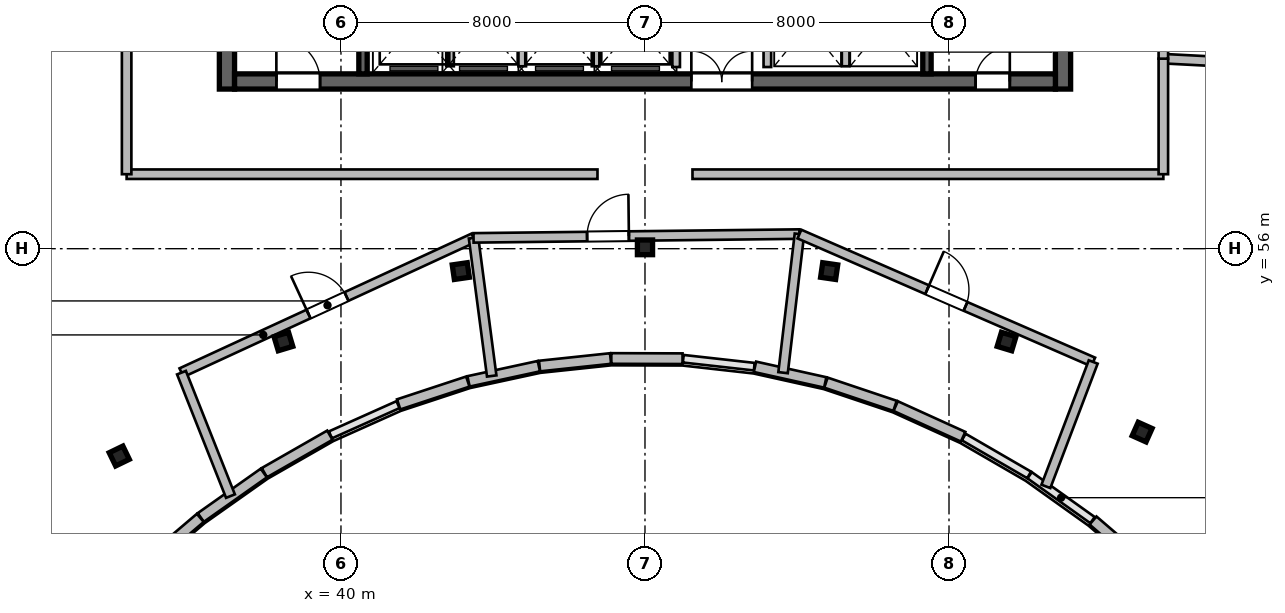
"""IFC4 building model, lengths in metres.
Left out: names, types, materials, properties, quantities, classifications, styles, units other than length and angle.
Written with IfcOpenShell. Run it as: python <this file> out.ifc"""

import sys

from ifc_helpers import new_model, si_unit, direction, frame, frame_2d, origin, origin_2d, place, context, subcontext, project, spatial, rectangle, i_section, extrude, source, transform, mapped, element, fill, save


model = new_model("IFC4")
c1 = context("Model", 3, precision=1e-05, world=origin(), true_north=direction((0.0, 1.0)))
c2 = subcontext(c1, "Body", "Model", "MODEL_VIEW")
j1 = project(units=[si_unit("LENGTHUNIT", "METRE"), si_unit("PLANEANGLEUNIT", "RADIAN")], contexts=[c1])
p1 = place(None, origin())
s1 = spatial("IfcSite", under=j1, at=p1, CompositionType="ELEMENT")
p2 = place(p1, origin())
s2 = spatial("IfcBuilding", under=s1, at=p2, CompositionType="ELEMENT")
p3 = place(p2, frame((0.0, 0.0, 260.1)))
s3 = spatial("IfcBuildingStorey", under=s2, at=p3, CompositionType="ELEMENT", Elevation=260.1)
m1 = source(origin(), c2, "Body", "SweptSolid", [
    extrude(rectangle(XDim=12.0, YDim=0.4, at=frame_2d((6.0, 0.0))), origin(), (0.0, 0.0, 1.0), 3.9),
])
for number, where, z_axis, x_axis in (
    (1, (37.0, 60.2, 0.0), (0.0, 0.0, 1.0), (0.0, 1.0, 0.0)),
    (2, (59.0, 60.2, 0.0), (0.0, 0.0, 1.0), (0.0, 1.0, 0.0)),
):
    element("IfcWall", number, at=place(p3, frame(where, z_axis=z_axis, x_axis=x_axis)), inside=s3, PredefinedType="SHEAR", context=c2, shape_type="MappedRepresentation", body=[
        mapped(m1, transform((0.0, 0.0, 0.0), scale=1.0)),
    ])
m2 = source(origin(), c2, "Body", "SweptSolid", [
    extrude(rectangle(XDim=21.6, YDim=0.4, at=frame_2d((10.8, 0.0))), origin(), (0.0, 0.0, 1.0), 3.9),
])
p4 = place(p3, frame((37.2, 60.4, 0.0), z_axis=(0.0, 0.0, 1.0), x_axis=(1.0, 0.0, 0.0)))
e3 = element("IfcWall", 3, at=p4, inside=s3, PredefinedType="SHEAR", context=c2, shape_type="MappedRepresentation", body=[
    mapped(m2, transform((0.0, 0.0, 0.0), scale=1.0)),
])
p5 = place(p4, frame((1.1, 0.0, 0.0)))
e4 = element("IfcOpeningElement", 4, at=p5, cuts=e3, PredefinedType="OPENING", context=c2, shape_type="SweptSolid", body=[
    extrude(rectangle(XDim=1.15, YDim=2.15, at=frame_2d((0.575, 1.075))), frame((0.0, 0.21, 0.0), z_axis=(0.0, -1.0, 0.0), x_axis=(1.0, 0.0, 0.0)), (0.0, 0.0, 1.0), 0.42),
])
p6 = place(p4, frame((19.5, 0.0, 0.0)))
e5 = element("IfcOpeningElement", 5, at=p6, cuts=e3, PredefinedType="OPENING", context=c2, shape_type="SweptSolid", body=[
    extrude(rectangle(XDim=0.9, YDim=2.1, at=frame_2d((0.45, 1.05))), frame((0.0, 0.21, 0.0), z_axis=(0.0, -1.0, 0.0), x_axis=(1.0, 0.0, 0.0)), (0.0, 0.0, 1.0), 0.42),
])
p7 = place(p4, frame((12.02, 0.0, 0.0)))
e6 = element("IfcOpeningElement", 6, at=p7, cuts=e3, PredefinedType="OPENING", context=c2, shape_type="SweptSolid", body=[
    extrude(rectangle(XDim=1.6, YDim=2.15, at=frame_2d((0.8, 1.075))), frame((0.0, 0.21, 0.0), z_axis=(0.0, -1.0, 0.0), x_axis=(1.0, 0.0, 0.0)), (0.0, 0.0, 1.0), 0.42),
])
m3 = source(origin(), c2, "Body", "SweptSolid", [
    extrude(rectangle(XDim=11.2, YDim=0.22, at=frame_2d((5.6, 0.0))), origin(), (0.0, 0.0, 1.0), 3.9),
])
p8 = place(p3, frame((40.58, 60.6, 0.0), z_axis=(0.0, 0.0, 1.0), x_axis=(0.0, 1.0, 0.0)))
e7 = element("IfcWall", 7, at=p8, inside=s3, PredefinedType="SHEAR", context=c2, shape_type="MappedRepresentation", body=[
    mapped(m3, transform((0.0, 0.0, 0.0), scale=1.0)),
])
p9 = place(p3, frame((55.42, 60.6, 0.0), z_axis=(0.0, 0.0, 1.0), x_axis=(0.0, 1.0, 0.0)))
e8 = element("IfcWall", 8, at=p9, inside=s3, PredefinedType="SHEAR", context=c2, shape_type="MappedRepresentation", body=[
    mapped(m3, transform((0.0, 0.0, 0.0), scale=1.0)),
])
p10 = place(p9, frame((9.645, 0.0, 0.0)))
e9 = element("IfcOpeningElement", 9, at=p10, cuts=e8, PredefinedType="OPENING", context=c2, shape_type="SweptSolid", body=[
    extrude(rectangle(XDim=1.15, YDim=2.15, at=frame_2d((0.575, 1.075))), frame((0.0, 0.12, 0.0), z_axis=(0.0, -1.0, 0.0), x_axis=(1.0, 0.0, 0.0)), (0.0, 0.0, 1.0), 0.24),
])
m4 = source(origin(), c2, "Body", "SweptSolid", [
    extrude(i_section(OverallWidth=0.399, OverallDepth=0.387, WebThickness=0.021, FlangeThickness=0.033, at=origin_2d()), origin(), (0.0, 0.0, 1.0), 3.9),
])
for number, where, z_axis, x_axis in (
    (10, (34.166, 50.545, 0.0), (0.0, 0.0, 1.0), (-0.436, 0.9, 0.0)),
    (11, (38.485, 53.558, 0.0), (0.0, 0.0, 1.0), (-0.289, 0.957, 0.0)),
    (12, (43.154, 55.411, 0.0), (0.0, 0.0, 1.0), (-0.143, 0.99, 0.0)),
    (13, (48.0, 56.036, 0.0), (0.0, 0.0, 1.0), (0.0, 1.0, 0.0)),
    (14, (52.846, 55.411, 0.0), (0.0, 0.0, 1.0), (0.143, 0.99, 0.0)),
    (15, (57.515, 53.558, 0.0), (0.0, 0.0, 1.0), (0.289, 0.957, 0.0)),
    (16, (61.082, 51.175, 0.0), (0.0, 0.0, 1.0), (0.409, 0.912, 0.0)),
):
    element("IfcColumn", number, at=place(p3, frame(where, z_axis=z_axis, x_axis=x_axis)), inside=s3, PredefinedType="COLUMN", context=c2, shape_type="MappedRepresentation", body=[
        mapped(m4, transform((0.0, 0.0, 0.0), scale=1.0)),
    ])
m5 = source(origin(), c2, "Body", "SweptSolid", [
    extrude(rectangle(XDim=2.04, YDim=0.28, at=frame_2d((1.02, 0.0))), origin(), (0.0, 0.0, 1.0), 3.65),
])
p11 = place(p3, frame((61.337, 47.519, 0.0), z_axis=(0.0, 0.0, 1.0), x_axis=(-0.758402847119, 0.651786101019, 0.0)))
e17 = element("IfcWall", 17, at=p11, inside=s3, PredefinedType="SOLIDWALL", context=c2, shape_type="MappedRepresentation", body=[
    mapped(m5, transform((0.0, 0.0, 0.0), scale=1.0)),
])
m6 = source(origin(), c2, "Body", "SweptSolid", [
    extrude(rectangle(XDim=1.95, YDim=0.28, at=frame_2d((0.975, 0.0))), origin(), (0.0, 0.0, 1.0), 3.65),
])
p12 = place(p3, frame((56.372, 51.052, 0.0), z_axis=(0.0, 0.0, 1.0), x_axis=(-0.910507945155, 0.413491574048, 0.0)))
e18 = element("IfcWall", 18, at=p12, inside=s3, PredefinedType="SOLIDWALL", context=c2, shape_type="MappedRepresentation", body=[
    mapped(m6, transform((0.0, 0.0, 0.0), scale=1.0)),
])
m7 = source(origin(), c2, "Body", "SweptSolid", [
    extrude(rectangle(XDim=1.918, YDim=0.28, at=frame_2d((0.959, 0.0))), origin(), (0.0, 0.0, 1.0), 3.65),
])
p13 = place(p3, frame((54.579, 51.865, 0.0), z_axis=(0.0, 0.0, 1.0), x_axis=(-0.947916697588, 0.318518342381, 0.0)))
e19 = element("IfcWall", 19, at=p13, inside=s3, PredefinedType="SOLIDWALL", context=c2, shape_type="MappedRepresentation", body=[
    mapped(m7, transform((0.0, 0.0, 0.0), scale=1.0)),
])
m8 = source(origin(), c2, "Body", "SweptSolid", [
    extrude(rectangle(XDim=1.894, YDim=0.28, at=frame_2d((0.947, 0.0))), origin(), (0.0, 0.0, 1.0), 3.65),
])
p14 = place(p3, frame((52.743, 52.481, 0.0), z_axis=(0.0, 0.0, 1.0), x_axis=(-0.976156721324, 0.217066937635, 0.0)))
e20 = element("IfcWall", 20, at=p14, inside=s3, PredefinedType="SOLIDWALL", context=c2, shape_type="MappedRepresentation", body=[
    mapped(m8, transform((0.0, 0.0, 0.0), scale=1.0)),
])
m9 = source(origin(), c2, "Body", "SweptSolid", [
    extrude(rectangle(XDim=1.874, YDim=0.28, at=frame_2d((0.937, 0.0))), origin(), (0.0, 0.0, 1.0), 3.65),
])
p15 = place(p3, frame((48.988, 53.106, 0.0), z_axis=(0.0, 0.0, 1.0), x_axis=(-0.999995893899, 0.002865690982, 0.0)))
e21 = element("IfcWall", 21, at=p15, inside=s3, PredefinedType="SOLIDWALL", context=c2, shape_type="MappedRepresentation", body=[
    mapped(m9, transform((0.0, 0.0, 0.0), scale=1.0)),
])
m10 = source(origin(), c2, "Body", "SweptSolid", [
    extrude(rectangle(XDim=1.879, YDim=0.28, at=frame_2d((0.939, 0.0))), origin(), (0.0, 0.0, 1.0), 3.65),
])
p16 = place(p3, frame((47.094, 53.11, 0.0), z_axis=(0.0, 0.0, 1.0), x_axis=(-0.994431872813, -0.105381451568, 0.0)))
e22 = element("IfcWall", 22, at=p16, inside=s3, PredefinedType="SOLIDWALL", context=c2, shape_type="MappedRepresentation", body=[
    mapped(m10, transform((0.0, 0.0, 0.0), scale=1.0)),
])
m11 = source(origin(), c2, "Body", "SweptSolid", [
    extrude(rectangle(XDim=1.893, YDim=0.28, at=frame_2d((0.947, 0.0))), origin(), (0.0, 0.0, 1.0), 3.65),
])
p17 = place(p3, frame((45.207, 52.909, 0.0), z_axis=(0.0, 0.0, 1.0), x_axis=(-0.977379595344, -0.21149261596, 0.0)))
e23 = element("IfcWall", 23, at=p17, inside=s3, PredefinedType="SOLIDWALL", context=c2, shape_type="MappedRepresentation", body=[
    mapped(m11, transform((0.0, 0.0, 0.0), scale=1.0)),
])
m12 = source(origin(), c2, "Body", "SweptSolid", [
    extrude(rectangle(XDim=1.916, YDim=0.28, at=frame_2d((0.958, 0.0))), origin(), (0.0, 0.0, 1.0), 3.65),
])
p18 = place(p3, frame((43.338, 52.503, 0.0), z_axis=(0.0, 0.0, 1.0), x_axis=(-0.949697632406, -0.313168336525, 0.0)))
e24 = element("IfcWall", 24, at=p18, inside=s3, PredefinedType="SOLIDWALL", context=c2, shape_type="MappedRepresentation", body=[
    mapped(m12, transform((0.0, 0.0, 0.0), scale=1.0)),
])
m13 = source(origin(), c2, "Body", "SweptSolid", [
    extrude(rectangle(XDim=1.986, YDim=0.28, at=frame_2d((0.993, 0.0))), origin(), (0.0, 0.0, 1.0), 3.65),
])
p19 = place(p3, frame((39.708, 51.093, 0.0), z_axis=(0.0, 0.0, 1.0), x_axis=(-0.867940364671, -0.496668423976, 0.0)))
e25 = element("IfcWall", 25, at=p19, inside=s3, PredefinedType="SOLIDWALL", context=c2, shape_type="MappedRepresentation", body=[
    mapped(m13, transform((0.0, 0.0, 0.0), scale=1.0)),
])
m14 = source(origin(), c2, "Body", "SweptSolid", [
    extrude(rectangle(XDim=2.03, YDim=0.28, at=frame_2d((1.015, 0.0))), origin(), (0.0, 0.0, 1.0), 3.65),
])
p20 = place(p3, frame((37.969, 50.097, 0.0), z_axis=(0.0, 0.0, 1.0), x_axis=(-0.816987864272, -0.576654861796, 0.0)))
e26 = element("IfcWall", 26, at=p20, inside=s3, PredefinedType="SOLIDWALL", context=c2, shape_type="MappedRepresentation", body=[
    mapped(m14, transform((0.0, 0.0, 0.0), scale=1.0)),
])
m15 = source(origin(), c2, "Body", "SweptSolid", [
    extrude(rectangle(XDim=2.078, YDim=0.28, at=frame_2d((1.039, 0.0))), origin(), (0.0, 0.0, 1.0), 3.65),
])
p21 = place(p3, frame((36.298, 48.917, 0.0), z_axis=(0.0, 0.0, 1.0), x_axis=(-0.761475215802, -0.648194026291, 0.0)))
e27 = element("IfcWall", 27, at=p21, inside=s3, PredefinedType="SOLIDWALL", context=c2, shape_type="MappedRepresentation", body=[
    mapped(m15, transform((0.0, 0.0, 0.0), scale=1.0)),
])
m16 = source(origin(), c2, "Body", "SweptSolid", [
    extrude(rectangle(XDim=2.24, YDim=0.2, at=frame_2d((1.12, 0.0))), origin(), (0.0, 0.0, 1.0), 3.65),
])
for number, where, z_axis, x_axis in (
    (28, (48.82, 60.78, 0.0), (0.0, 0.0, 1.0), (0.0, 1.0, 0.0)),
    (29, (51.22, 60.78, 0.0), (0.0, 0.0, 1.0), (0.0, 1.0, 0.0)),
):
    element("IfcWall", number, at=place(p3, frame(where, z_axis=z_axis, x_axis=x_axis)), inside=s3, PredefinedType="SOLIDWALL", context=c2, shape_type="MappedRepresentation", body=[
        mapped(m16, transform((0.0, 0.0, 0.0), scale=1.0)),
    ])
m17 = source(origin(), c2, "Body", "SweptSolid", [
    extrude(rectangle(XDim=2.2, YDim=0.2, at=frame_2d((1.1, 0.0))), origin(), (0.0, 0.0, 1.0), 3.65),
])
for number, where, z_axis, x_axis in (
    (30, (42.87, 60.8, 0.0), (0.0, 0.0, 1.0), (0.0, 1.0, 0.0)),
    (31, (44.77, 60.8, 0.0), (0.0, 0.0, 1.0), (0.0, 1.0, 0.0)),
    (32, (46.7, 60.8, 0.0), (0.0, 0.0, 1.0), (0.0, 1.0, 0.0)),
    (33, (53.28, 60.8, 0.0), (0.0, 0.0, 1.0), (0.0, 1.0, 0.0)),
):
    element("IfcWall", number, at=place(p3, frame(where, z_axis=z_axis, x_axis=x_axis)), inside=s3, PredefinedType="SOLIDWALL", context=c2, shape_type="MappedRepresentation", body=[
        mapped(m17, transform((0.0, 0.0, 0.0), scale=1.0)),
    ])
m18 = source(origin(), c2, "Body", "SweptSolid", [
    extrude(rectangle(XDim=8.464, YDim=0.25, at=frame_2d((4.232, 0.0))), origin(), (0.0, 0.0, 1.0), 3.65),
])
p22 = place(p3, frame((35.803, 52.738, 0.0), z_axis=(0.0, 0.0, 1.0), x_axis=(0.90801678306, 0.418933791524, 0.0)))
e34 = element("IfcWall", 34, at=p22, inside=s3, PredefinedType="PARTITIONING", context=c2, shape_type="MappedRepresentation", body=[
    mapped(m18, transform((0.0, 0.0, 0.0), scale=1.0)),
])
p23 = place(p22, frame((3.682, 0.0, 0.0)))
e35 = element("IfcOpeningElement", 35, at=p23, cuts=e34, PredefinedType="OPENING", context=c2, shape_type="SweptSolid", body=[
    extrude(rectangle(XDim=1.1, YDim=2.15, at=frame_2d((0.55, 1.075))), frame((0.0, 0.135, 0.0), z_axis=(0.0, -1.0, 0.0), x_axis=(1.0, 0.0, 0.0)), (0.0, 0.0, 1.0), 0.27),
])
m19 = source(origin(), c2, "Body", "SweptSolid", [
    extrude(rectangle(XDim=3.495, YDim=0.25, at=frame_2d((1.747, 0.0))), origin(), (0.0, 0.0, 1.0), 3.65),
])
p24 = place(p3, frame((37.092, 49.49, 0.0), z_axis=(0.0, 0.0, 1.0), x_axis=(-0.368859890644, 0.929485008526, 0.0)))
e36 = element("IfcWall", 36, at=p24, inside=s3, PredefinedType="PARTITIONING", context=c2, shape_type="MappedRepresentation", body=[
    mapped(m19, transform((0.0, 0.0, 0.0), scale=1.0)),
])
m20 = source(origin(), c2, "Body", "SweptSolid", [
    extrude(rectangle(XDim=3.665, YDim=0.25, at=frame_2d((1.832, 0.0))), origin(), (0.0, 0.0, 1.0), 3.65),
])
p25 = place(p3, frame((43.967, 52.651, 0.0), z_axis=(0.0, 0.0, 1.0), x_axis=(-0.130509659129, 0.991447037856, 0.0)))
e37 = element("IfcWall", 37, at=p25, inside=s3, PredefinedType="PARTITIONING", context=c2, shape_type="MappedRepresentation", body=[
    mapped(m20, transform((0.0, 0.0, 0.0), scale=1.0)),
])
m21 = source(origin(), c2, "Body", "SweptSolid", [
    extrude(rectangle(XDim=8.576, YDim=0.25, at=frame_2d((4.288, 0.0))), origin(), (0.0, 0.0, 1.0), 3.65),
])
p26 = place(p3, frame((43.489, 56.284, 0.0), z_axis=(0.0, 0.0, 1.0), x_axis=(0.999931553434, 0.011699933624, 0.0)))
e38 = element("IfcWall", 38, at=p26, inside=s3, PredefinedType="PARTITIONING", context=c2, shape_type="MappedRepresentation", body=[
    mapped(m21, transform((0.0, 0.0, 0.0), scale=1.0)),
])
p27 = place(p26, frame((2.988, 0.0, 0.0)))
e39 = element("IfcOpeningElement", 39, at=p27, cuts=e38, PredefinedType="OPENING", context=c2, shape_type="SweptSolid", body=[
    extrude(rectangle(XDim=1.1, YDim=2.15, at=frame_2d((0.55, 1.075))), frame((0.0, 0.135, 0.0), z_axis=(0.0, -1.0, 0.0), x_axis=(1.0, 0.0, 0.0)), (0.0, 0.0, 1.0), 0.27),
])
m22 = source(origin(), c2, "Body", "SweptSolid", [
    extrude(rectangle(XDim=3.672, YDim=0.25, at=frame_2d((1.836, 0.0))), origin(), (0.0, 0.0, 1.0), 3.65),
])
p28 = place(p3, frame((51.633, 52.738, 0.0), z_axis=(0.0, 0.0, 1.0), x_axis=(0.117362064027, 0.993089193339, 0.0)))
e40 = element("IfcWall", 40, at=p28, inside=s3, PredefinedType="PARTITIONING", context=c2, shape_type="MappedRepresentation", body=[
    mapped(m22, transform((0.0, 0.0, 0.0), scale=1.0)),
])
m23 = source(origin(), c2, "Body", "SweptSolid", [
    extrude(rectangle(XDim=8.431, YDim=0.25, at=frame_2d((4.216, 0.0))), origin(), (0.0, 0.0, 1.0), 3.65),
])
p29 = place(p3, frame((52.064, 56.385, 0.0), z_axis=(0.0, 0.0, 1.0), x_axis=(0.916868304583, -0.399189819574, 0.0)))
e41 = element("IfcWall", 41, at=p29, inside=s3, PredefinedType="PARTITIONING", context=c2, shape_type="MappedRepresentation", body=[
    mapped(m23, transform((0.0, 0.0, 0.0), scale=1.0)),
])
p30 = place(p29, frame((3.666, 0.0, 0.0)))
e42 = element("IfcOpeningElement", 42, at=p30, cuts=e41, PredefinedType="OPENING", context=c2, shape_type="SweptSolid", body=[
    extrude(rectangle(XDim=1.1, YDim=2.15, at=frame_2d((0.55, 1.075))), frame((0.0, 0.135, 0.0), z_axis=(0.0, -1.0, 0.0), x_axis=(1.0, 0.0, 0.0)), (0.0, 0.0, 1.0), 0.27),
])
m24 = source(origin(), c2, "Body", "SweptSolid", [
    extrude(rectangle(XDim=3.502, YDim=0.25, at=frame_2d((1.751, 0.0))), origin(), (0.0, 0.0, 1.0), 3.65),
])
p31 = place(p3, frame((58.55, 49.746, 0.0), z_axis=(0.0, 0.0, 1.0), x_axis=(0.35542122772, 0.934706237749, 0.0)))
e43 = element("IfcWall", 43, at=p31, inside=s3, PredefinedType="PARTITIONING", context=c2, shape_type="MappedRepresentation", body=[
    mapped(m24, transform((0.0, 0.0, 0.0), scale=1.0)),
])
m25 = source(origin(), c2, "Body", "SweptSolid", [
    extrude(rectangle(XDim=12.39, YDim=0.25, at=frame_2d((6.195, 0.0))), origin(), (0.0, 0.0, 1.0), 3.65),
])
for number, where, z_axis, x_axis in (
    (44, (34.36, 57.96, 0.0), (0.0, 0.0, 1.0), (1.0, 0.0, 0.0)),
    (45, (49.25, 57.96, 0.0), (0.0, 0.0, 1.0), (1.0, 0.0, 0.0)),
):
    element("IfcWall", number, at=place(p3, frame(where, z_axis=z_axis, x_axis=x_axis)), inside=s3, PredefinedType="PARTITIONING", context=c2, shape_type="MappedRepresentation", body=[
        mapped(m25, transform((0.0, 0.0, 0.0), scale=1.0)),
    ])
m26 = source(origin(), c2, "Body", "SweptSolid", [
    extrude(rectangle(XDim=4.04, YDim=0.25, at=frame_2d((2.02, 0.0))), origin(), (0.0, 0.0, 1.0), 3.65),
])
p32 = place(p3, frame((34.36, 57.96, 0.0), z_axis=(0.0, 0.0, 1.0), x_axis=(0.0, 1.0, 0.0)))
e46 = element("IfcWall", 46, at=p32, inside=s3, PredefinedType="PARTITIONING", context=c2, shape_type="MappedRepresentation", body=[
    mapped(m26, transform((0.0, 0.0, 0.0), scale=1.0)),
])
m27 = source(origin(), c2, "Body", "SweptSolid", [
    extrude(rectangle(XDim=12.938, YDim=0.25, at=frame_2d((6.469, 0.0))), origin(), (0.0, 0.0, 1.0), 3.65),
])
p33 = place(p3, frame((61.64, 61.0, 0.0), z_axis=(0.0, 0.0, 1.0), x_axis=(0.998643821866, -0.052062626215, 0.0)))
e47 = element("IfcWall", 47, at=p33, inside=s3, PredefinedType="PARTITIONING", context=c2, shape_type="MappedRepresentation", body=[
    mapped(m27, transform((0.0, 0.0, 0.0), scale=1.0)),
])
m28 = source(origin(), c2, "Body", "SweptSolid", [
    extrude(rectangle(XDim=3.04, YDim=0.25, at=frame_2d((1.52, 0.0))), origin(), (0.0, 0.0, 1.0), 3.65),
])
p34 = place(p3, frame((61.64, 57.96, 0.0), z_axis=(0.0, 0.0, 1.0), x_axis=(0.0, 1.0, 0.0)))
e48 = element("IfcWall", 48, at=p34, inside=s3, PredefinedType="PARTITIONING", context=c2, shape_type="MappedRepresentation", body=[
    mapped(m28, transform((0.0, 0.0, 0.0), scale=1.0)),
])
m29 = source(origin(), c2, "Body", "SweptSolid", [
    extrude(rectangle(XDim=3.8, YDim=0.25, at=frame_2d((1.9, 0.0))), origin(), (0.0, 0.0, 1.0), 3.65),
])
p35 = place(p3, frame((61.64, 61.0, 0.0), z_axis=(0.0, 0.0, 1.0), x_axis=(0.0, 1.0, 0.0)))
e49 = element("IfcWall", 49, at=p35, inside=s3, PredefinedType="PARTITIONING", context=c2, shape_type="MappedRepresentation", body=[
    mapped(m29, transform((0.0, 0.0, 0.0), scale=1.0)),
])
p36 = place(p35, frame((0.969, 0.0, 0.0)))
e50 = element("IfcOpeningElement", 50, at=p36, cuts=e49, PredefinedType="OPENING", context=c2, shape_type="SweptSolid", body=[
    extrude(rectangle(XDim=0.95, YDim=2.1, at=frame_2d((0.475, 1.05))), frame((0.0, 0.135, 0.0), z_axis=(0.0, -1.0, 0.0), x_axis=(1.0, 0.0, 0.0)), (0.0, 0.0, 1.0), 0.27),
])
m30 = source(origin(), c2, "Body", "SweptSolid", [
    extrude(rectangle(XDim=1.15, YDim=2.15, at=frame_2d((0.575, 1.075))), frame((0.0, 0.025, 0.0), z_axis=(0.0, -1.0, 0.0), x_axis=(1.0, 0.0, 0.0)), (0.0, 0.0, 1.0), 0.05),
])
p37 = place(p5, origin())
e51 = element("IfcDoor", 51, at=p37, inside=s3, OperationType="SINGLE_SWING_LEFT", PredefinedType="DOOR", context=c2, shape_type="MappedRepresentation", body=[
    mapped(m30, transform((0.0, 0.0, 0.0), scale=1.0)),
])
fill(e4, e51)
m31 = source(origin(), c2, "Body", "SweptSolid", [
    extrude(rectangle(XDim=0.9, YDim=2.1, at=frame_2d((0.45, 1.05))), frame((0.0, 0.025, 0.0), z_axis=(0.0, -1.0, 0.0), x_axis=(1.0, 0.0, 0.0)), (0.0, 0.0, 1.0), 0.05),
])
p38 = place(p6, origin())
e52 = element("IfcDoor", 52, at=p38, inside=s3, OperationType="SINGLE_SWING_RIGHT", PredefinedType="DOOR", context=c2, shape_type="MappedRepresentation", body=[
    mapped(m31, transform((0.0, 0.0, 0.0), scale=1.0)),
])
fill(e5, e52)
m32 = source(origin(), c2, "Body", "SweptSolid", [
    extrude(rectangle(XDim=1.6, YDim=2.15, at=frame_2d((0.8, 1.075))), frame((0.0, 0.025, 0.0), z_axis=(0.0, -1.0, 0.0), x_axis=(1.0, 0.0, 0.0)), (0.0, 0.0, 1.0), 0.05),
])
p39 = place(p7, origin())
e53 = element("IfcDoor", 53, at=p39, inside=s3, OperationType="DOUBLE_DOOR_SINGLE_SWING", PredefinedType="DOOR", context=c2, shape_type="MappedRepresentation", body=[
    mapped(m32, transform((0.0, 0.0, 0.0), scale=1.0)),
])
fill(e6, e53)
m33 = source(origin(), c2, "Body", "SweptSolid", [
    extrude(rectangle(XDim=1.1, YDim=2.15, at=frame_2d((0.55, 1.075))), frame((0.0, 0.025, 0.0), z_axis=(0.0, -1.0, 0.0), x_axis=(1.0, 0.0, 0.0)), (0.0, 0.0, 1.0), 0.05),
])
p40 = place(p23, origin())
e54 = element("IfcDoor", 54, at=p40, inside=s3, OperationType="SINGLE_SWING_LEFT", PredefinedType="DOOR", context=c2, shape_type="MappedRepresentation", body=[
    mapped(m33, transform((0.0, 0.0, 0.0), scale=1.0)),
])
fill(e35, e54)
p41 = place(p27, origin())
e55 = element("IfcDoor", 55, at=p41, inside=s3, OperationType="SINGLE_SWING_RIGHT", PredefinedType="DOOR", context=c2, shape_type="MappedRepresentation", body=[
    mapped(m33, transform((0.0, 0.0, 0.0), scale=1.0)),
])
fill(e39, e55)
p42 = place(p30, origin())
e56 = element("IfcDoor", 56, at=p42, inside=s3, OperationType="SINGLE_SWING_LEFT", PredefinedType="DOOR", context=c2, shape_type="MappedRepresentation", body=[
    mapped(m33, transform((0.0, 0.0, 0.0), scale=1.0)),
])
fill(e42, e56)
save(model, sys.argv[1])
